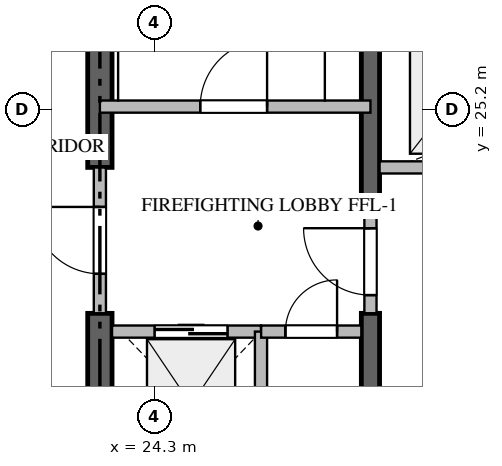
"""IFC4 building model, lengths in metres.
Left out: names, types, materials, properties, quantities, classifications, styles, units other than length and angle.
Written with IfcOpenShell. Run it as: python <this file> out.ifc"""

import sys

from ifc_helpers import new_model, si_unit, direction, frame, frame_2d, origin, place, context, subcontext, project, spatial, rectangle, extrude, source, transform, mapped, element, fill, save


model = new_model("IFC4")
c1 = context("Model", 3, precision=1e-05, world=origin(), true_north=direction((0.0, 1.0)))
c2 = subcontext(c1, "Body", "Model", "MODEL_VIEW")
j1 = project(units=[si_unit("LENGTHUNIT", "METRE"), si_unit("PLANEANGLEUNIT", "RADIAN")], contexts=[c1])
p1 = place(None, origin())
s1 = spatial("IfcSite", under=j1, at=p1, CompositionType="ELEMENT")
p2 = place(p1, origin())
s2 = spatial("IfcBuilding", under=s1, at=p2, CompositionType="ELEMENT")
p3 = place(p2, frame((0.0, 0.0, 176.4)))
s3 = spatial("IfcBuildingStorey", under=s2, at=p3, CompositionType="ELEMENT", Elevation=176.4)
p4 = place(p3, frame((23.4, 17.0, -0.26), z_axis=(0.0, 0.0, 1.0), x_axis=(0.0, 1.0, 0.0)))
e1 = element("IfcWall", 1, at=p4, inside=s3, PredefinedType="SHEAR", context=c2, shape_type="SweptSolid", body=[
    extrude(rectangle(XDim=4.85, YDim=0.4, at=frame_2d((2.425, 0.0))), origin(), (0.0, 0.0, 1.0), 3.748),
])
p5 = place(p3, frame((23.4, 24.25, -0.26), z_axis=(0.0, 0.0, 1.0), x_axis=(0.0, 1.0, 0.0)))
e2 = element("IfcWall", 2, at=p5, inside=s3, PredefinedType="SHEAR", context=c2, shape_type="SweptSolid", body=[
    extrude(rectangle(XDim=9.15, YDim=0.4, at=frame_2d((4.575, 0.0))), origin(), (0.0, 0.0, 1.0), 3.748),
])
p6 = place(p3, frame((27.85, 17.0, -0.26), z_axis=(0.0, 0.0, 1.0), x_axis=(0.0, 1.0, 0.0)))
e3 = element("IfcWall", 3, at=p6, inside=s3, PredefinedType="SHEAR", context=c2, shape_type="SweptSolid", body=[
    extrude(rectangle(XDim=4.85, YDim=0.3, at=frame_2d((2.425, 0.0))), origin(), (0.0, 0.0, 1.0), 3.748),
])
p7 = place(p3, frame((27.85, 23.55, -0.26), z_axis=(0.0, 0.0, 1.0), x_axis=(0.0, 1.0, 0.0)))
e4 = element("IfcWall", 4, at=p7, inside=s3, PredefinedType="SHEAR", context=c2, shape_type="SweptSolid", body=[
    extrude(rectangle(XDim=9.85, YDim=0.3, at=frame_2d((4.925, 0.0))), origin(), (0.0, 0.0, 1.0), 3.748),
])
p8 = place(p3, frame((23.4, 25.25, 0.0), z_axis=(0.0, 0.0, 1.0), x_axis=(1.0, 0.0, 0.0)))
e5 = element("IfcWall", 5, at=p8, inside=s3, PredefinedType="STANDARD", context=c2, shape_type="SweptSolid", body=[
    extrude(rectangle(XDim=4.45, YDim=0.2, at=frame_2d((2.225, 0.0))), origin(), (0.0, 0.0, 1.0), 3.49),
])
p9 = place(p8, frame((1.65, 0.0, 0.0)))
e6 = element("IfcOpeningElement", 6, at=p9, cuts=e5, PredefinedType="OPENING", context=c2, shape_type="SweptSolid", body=[
    extrude(rectangle(XDim=1.1, YDim=2.15, at=frame_2d((0.55, 1.075))), frame((0.0, 0.11, 0.0), z_axis=(0.0, -1.0, 0.0), x_axis=(1.0, 0.0, 0.0)), (0.0, 0.0, 1.0), 0.22),
])
p10 = place(p3, frame((23.6, 21.55, 0.0), z_axis=(0.0, 0.0, 1.0), x_axis=(1.0, 0.0, 0.0)))
e7 = element("IfcWall", 7, at=p10, inside=s3, PredefinedType="STANDARD", context=c2, shape_type="SweptSolid", body=[
    extrude(rectangle(XDim=2.45, YDim=0.2, at=frame_2d((1.225, 0.0))), origin(), (0.0, 0.0, 1.0), 3.49),
])
p11 = place(p10, frame((0.7, 0.0, 0.0)))
e8 = element("IfcOpeningElement", 8, at=p11, cuts=e7, PredefinedType="OPENING", context=c2, shape_type="SweptSolid", body=[
    extrude(rectangle(XDim=1.2, YDim=2.2, at=frame_2d((0.6, 1.1))), frame((0.0, 0.11, 0.0), z_axis=(0.0, -1.0, 0.0), x_axis=(1.0, 0.0, 0.0)), (0.0, 0.0, 1.0), 0.22),
])
p12 = place(p3, frame((28.0, 24.25, 0.0), z_axis=(0.0, 0.0, 1.0), x_axis=(1.0, 0.0, 0.0)))
e9 = element("IfcWall", 9, at=p12, inside=s3, PredefinedType="STANDARD", context=c2, shape_type="SweptSolid", body=[
    extrude(rectangle(XDim=2.425, YDim=0.2, at=frame_2d((1.212, 0.0))), origin(), (0.0, 0.0, 1.0), 3.49),
])
p13 = place(p12, frame((0.75, 0.0, 0.0)))
e10 = element("IfcOpeningElement", 10, at=p13, cuts=e9, PredefinedType="OPENING", context=c2, shape_type="SweptSolid", body=[
    extrude(rectangle(XDim=1.1, YDim=2.2, at=frame_2d((0.55, 1.1))), frame((0.0, 0.11, 0.0), z_axis=(0.0, -1.0, 0.0), x_axis=(1.0, 0.0, 0.0)), (0.0, 0.0, 1.0), 0.22),
])
p14 = place(p3, frame((26.05, 19.05, 0.0), z_axis=(0.0, 0.0, 1.0), x_axis=(0.0, 1.0, 0.0)))
e11 = element("IfcWall", 11, at=p14, inside=s3, PredefinedType="STANDARD", context=c2, shape_type="SweptSolid", body=[
    extrude(rectangle(XDim=2.5, YDim=0.2, at=frame_2d((1.25, 0.0))), origin(), (0.0, 0.0, 1.0), 3.49),
])
p15 = place(p3, frame((26.052, 21.55, 0.0), z_axis=(0.0, 0.0, 1.0), x_axis=(1.0, 0.0, 0.0)))
e12 = element("IfcWall", 12, at=p15, inside=s3, PredefinedType="STANDARD", context=c2, shape_type="SweptSolid", body=[
    extrude(rectangle(XDim=1.648, YDim=0.2, at=frame_2d((0.824, 0.0))), origin(), (0.0, 0.0, 1.0), 3.49),
])
p16 = place(p15, frame((0.399, 0.0, 0.0)))
e13 = element("IfcOpeningElement", 13, at=p16, cuts=e12, PredefinedType="OPENING", context=c2, shape_type="SweptSolid", body=[
    extrude(rectangle(XDim=0.85, YDim=2.1, at=frame_2d((0.425, 1.05))), frame((0.0, 0.11, 0.0), z_axis=(0.0, -1.0, 0.0), x_axis=(1.0, 0.0, 0.0)), (0.0, 0.0, 1.0), 0.22),
])
p17 = place(p3, frame((23.4, 21.852, 0.0), z_axis=(0.0, 0.0, 1.0), x_axis=(0.0, 1.0, 0.0)))
e14 = element("IfcWall", 14, at=p17, inside=s3, PredefinedType="STANDARD", context=c2, shape_type="SweptSolid", body=[
    extrude(rectangle(XDim=2.396, YDim=0.2, at=frame_2d((1.198, 0.0))), origin(), (0.0, 0.0, 1.0), 3.49),
])
p18 = place(p17, frame((0.648, 0.0, 0.0)))
e15 = element("IfcOpeningElement", 15, at=p18, cuts=e14, PredefinedType="OPENING", context=c2, shape_type="SweptSolid", body=[
    extrude(rectangle(XDim=1.1, YDim=2.15, at=frame_2d((0.55, 1.075))), frame((0.0, 0.11, 0.0), z_axis=(0.0, -1.0, 0.0), x_axis=(1.0, 0.0, 0.0)), (0.0, 0.0, 1.0), 0.22),
])
p19 = place(p3, frame((27.85, 21.852, 0.0), z_axis=(0.0, 0.0, 1.0), x_axis=(0.0, 1.0, 0.0)))
e16 = element("IfcWall", 16, at=p19, inside=s3, PredefinedType="STANDARD", context=c2, shape_type="SweptSolid", body=[
    extrude(rectangle(XDim=1.696, YDim=0.2, at=frame_2d((0.848, 0.0))), origin(), (0.0, 0.0, 1.0), 3.49),
])
p20 = place(p19, frame((0.298, 0.0, 0.0)))
e17 = element("IfcOpeningElement", 17, at=p20, cuts=e16, PredefinedType="OPENING", context=c2, shape_type="SweptSolid", body=[
    extrude(rectangle(XDim=1.1, YDim=2.15, at=frame_2d((0.55, 1.075))), frame((0.0, 0.11, 0.0), z_axis=(0.0, -1.0, 0.0), x_axis=(1.0, 0.0, 0.0)), (0.0, 0.0, 1.0), 0.22),
])
m1 = source(origin(), c2, "Body", "SweptSolid", [
    extrude(rectangle(XDim=1.1, YDim=2.15, at=frame_2d((0.55, 1.075))), frame((0.0, 0.025, 0.0), z_axis=(0.0, -1.0, 0.0), x_axis=(1.0, 0.0, 0.0)), (0.0, 0.0, 1.0), 0.05),
])
p21 = place(p9, origin())
e18 = element("IfcDoor", 18, at=p21, inside=s3, OperationType="SINGLE_SWING_RIGHT", PredefinedType="DOOR", context=c2, shape_type="MappedRepresentation", body=[
    mapped(m1, transform((0.0, 0.0, 0.0), scale=1.0)),
])
fill(e6, e18)
m2 = source(origin(), c2, "Body", "SweptSolid", [
    extrude(rectangle(XDim=1.2, YDim=2.2, at=frame_2d((0.6, 1.1))), frame((0.0, 0.025, 0.0), z_axis=(0.0, -1.0, 0.0), x_axis=(1.0, 0.0, 0.0)), (0.0, 0.0, 1.0), 0.05),
])
p22 = place(p11, origin())
e19 = element("IfcDoor", 19, at=p22, inside=s3, OperationType="DOUBLE_DOOR_SLIDING", PredefinedType="DOOR", context=c2, shape_type="MappedRepresentation", body=[
    mapped(m2, transform((0.0, 0.0, 0.0), scale=1.0)),
])
fill(e8, e19)
m3 = source(origin(), c2, "Body", "SweptSolid", [
    extrude(rectangle(XDim=0.85, YDim=2.1, at=frame_2d((0.425, 1.05))), frame((0.0, 0.025, 0.0), z_axis=(0.0, -1.0, 0.0), x_axis=(1.0, 0.0, 0.0)), (0.0, 0.0, 1.0), 0.05),
])
p23 = place(p16, origin())
e20 = element("IfcDoor", 20, at=p23, inside=s3, OperationType="SINGLE_SWING_RIGHT", PredefinedType="DOOR", context=c2, shape_type="MappedRepresentation", body=[
    mapped(m3, transform((0.0, 0.0, 0.0), scale=1.0)),
])
fill(e13, e20)
p24 = place(p18, origin())
e21 = element("IfcDoor", 21, at=p24, inside=s3, OperationType="SINGLE_SWING_RIGHT", PredefinedType="DOOR", context=c2, shape_type="MappedRepresentation", body=[
    mapped(m1, transform((0.0, 0.0, 0.0), scale=1.0)),
])
fill(e15, e21)
p25 = place(p20, origin())
e22 = element("IfcDoor", 22, at=p25, inside=s3, OperationType="SINGLE_SWING_RIGHT", PredefinedType="DOOR", context=c2, shape_type="MappedRepresentation", body=[
    mapped(m1, transform((0.0, 0.0, 0.0), scale=1.0)),
])
fill(e17, e22)
save(model, sys.argv[1])
